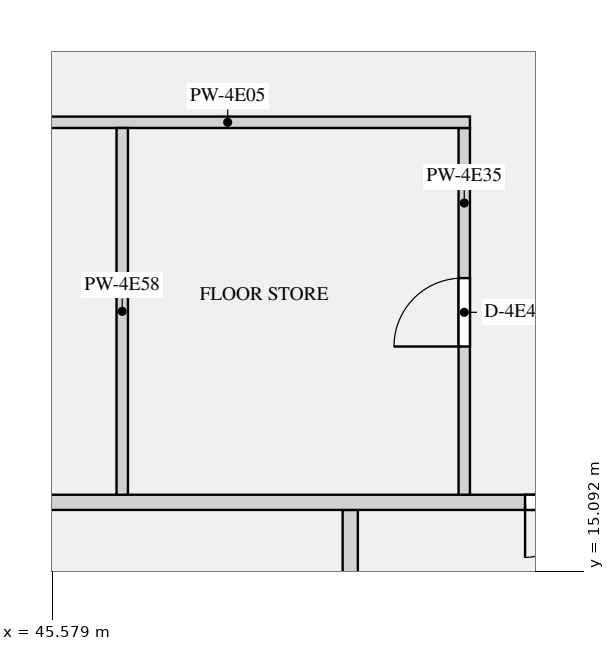
"""IFC4 building model, lengths in metres.
Left out: names, types, materials, properties, quantities, classifications, styles, units other than length and angle.
Written with IfcOpenShell. Run it as: python <this file> out.ifc"""

import sys

from ifc_helpers import new_model, si_unit, direction, frame, frame_2d, origin, place, context, subcontext, project, spatial, rectangle, extrude, element, fill, save


model = new_model("IFC4")
c1 = context("Model", 3, precision=1e-05, world=origin(), true_north=direction((0.0, 1.0)))
c2 = subcontext(c1, "Body", "Model", "MODEL_VIEW")
j1 = project(units=[si_unit("LENGTHUNIT", "METRE"), si_unit("PLANEANGLEUNIT", "RADIAN")], contexts=[c1])
p1 = place(None, origin())
s1 = spatial("IfcSite", under=j1, at=p1, CompositionType="ELEMENT")
p2 = place(p1, origin())
s2 = spatial("IfcBuilding", under=s1, at=p2, CompositionType="ELEMENT")
p3 = place(p2, frame((0.0, 0.0, 232.65)))
s3 = spatial("IfcBuildingStorey", under=s2, at=p3, CompositionType="ELEMENT", Elevation=232.65)
p4 = place(p3, frame((49.5, 12.5, 0.0), z_axis=(0.0, 0.0, 1.0), x_axis=(0.0, 1.0, 0.0)))
e1 = element("IfcWall", 1, at=p4, inside=s3, PredefinedType="PARTITIONING", context=c2, shape_type="SweptSolid", body=[
    extrude(rectangle(XDim=3.4, YDim=0.2, at=frame_2d((1.7, 0.0))), origin(), (0.0, 0.0, 1.0), 2.8),
])
p5 = place(p4, frame((1.15, 0.0, 0.0)))
e2 = element("IfcOpeningElement", 2, at=p5, cuts=e1, PredefinedType="OPENING", context=c2, shape_type="SweptSolid", body=[
    extrude(rectangle(XDim=1.1, YDim=2.1, at=frame_2d((0.55, 1.05))), frame((0.0, 0.11, 0.0), z_axis=(0.0, -1.0, 0.0), x_axis=(1.0, 0.0, 0.0)), (0.0, 0.0, 1.0), 0.22),
])
p6 = place(p3, frame((20.925, 21.0, 0.0), z_axis=(0.0, 0.0, 1.0), x_axis=(1.0, 0.0, 0.0)))
e3 = element("IfcWall", 3, at=p6, inside=s3, PredefinedType="PARTITIONING", context=c2, shape_type="SweptSolid", body=[
    extrude(rectangle(XDim=30.15, YDim=0.15, at=frame_2d((15.075, 0.0))), origin(), (0.0, 0.0, 1.0), 2.8),
])
p7 = place(p6, frame((6.375, 0.0, 0.0)))
e4 = element("IfcOpeningElement", 4, at=p7, cuts=e3, PredefinedType="OPENING", context=c2, shape_type="SweptSolid", body=[
    extrude(rectangle(XDim=0.9, YDim=2.1, at=frame_2d((0.45, 1.05))), frame((0.0, 0.085, 0.0), z_axis=(0.0, -1.0, 0.0), x_axis=(1.0, 0.0, 0.0)), (0.0, 0.0, 1.0), 0.17),
])
p8 = place(p6, frame((10.875, 0.0, 0.0)))
e5 = element("IfcOpeningElement", 5, at=p8, cuts=e3, PredefinedType="OPENING", context=c2, shape_type="SweptSolid", body=[
    extrude(rectangle(XDim=0.9, YDim=2.1, at=frame_2d((0.45, 1.05))), frame((0.0, 0.085, 0.0), z_axis=(0.0, -1.0, 0.0), x_axis=(1.0, 0.0, 0.0)), (0.0, 0.0, 1.0), 0.17),
])
p9 = place(p6, frame((16.875, 0.0, 0.0)))
e6 = element("IfcOpeningElement", 6, at=p9, cuts=e3, PredefinedType="OPENING", context=c2, shape_type="SweptSolid", body=[
    extrude(rectangle(XDim=0.9, YDim=2.1, at=frame_2d((0.45, 1.05))), frame((0.0, 0.085, 0.0), z_axis=(0.0, -1.0, 0.0), x_axis=(1.0, 0.0, 0.0)), (0.0, 0.0, 1.0), 0.17),
])
p10 = place(p6, frame((22.875, 0.0, 0.0)))
e7 = element("IfcOpeningElement", 7, at=p10, cuts=e3, PredefinedType="OPENING", context=c2, shape_type="SweptSolid", body=[
    extrude(rectangle(XDim=0.9, YDim=2.1, at=frame_2d((0.45, 1.05))), frame((0.0, 0.085, 0.0), z_axis=(0.0, -1.0, 0.0), x_axis=(1.0, 0.0, 0.0)), (0.0, 0.0, 1.0), 0.17),
])
p11 = place(p3, frame((17.9, 16.0, 0.0), z_axis=(0.0, 0.0, 1.0), x_axis=(1.0, 0.0, 0.0)))
e8 = element("IfcWall", 8, at=p11, inside=s3, PredefinedType="PARTITIONING", context=c2, shape_type="SweptSolid", body=[
    extrude(rectangle(XDim=36.2, YDim=0.2, at=frame_2d((18.1, 0.0))), origin(), (0.0, 0.0, 1.0), 2.8),
])
p12 = place(p11, frame((0.9, 0.0, 0.0)))
e9 = element("IfcOpeningElement", 9, at=p12, cuts=e8, PredefinedType="OPENING", context=c2, shape_type="SweptSolid", body=[
    extrude(rectangle(XDim=1.4, YDim=2.1, at=frame_2d((0.7, 1.05))), frame((0.0, 0.11, 0.0), z_axis=(0.0, -1.0, 0.0), x_axis=(1.0, 0.0, 0.0)), (0.0, 0.0, 1.0), 0.22),
])
p13 = place(p11, frame((33.9, 0.0, 0.0)))
e10 = element("IfcOpeningElement", 10, at=p13, cuts=e8, PredefinedType="OPENING", context=c2, shape_type="SweptSolid", body=[
    extrude(rectangle(XDim=1.4, YDim=2.1, at=frame_2d((0.7, 1.05))), frame((0.0, 0.11, 0.0), z_axis=(0.0, -1.0, 0.0), x_axis=(1.0, 0.0, 0.0)), (0.0, 0.0, 1.0), 0.22),
])
p14 = place(p3, frame((51.0, 16.1, 0.0), z_axis=(0.0, 0.0, 1.0), x_axis=(0.0, 1.0, 0.0)))
e11 = element("IfcWall", 11, at=p14, inside=s3, PredefinedType="PARTITIONING", context=c2, shape_type="SweptSolid", body=[
    extrude(rectangle(XDim=4.825, YDim=0.15, at=frame_2d((2.413, 0.0))), origin(), (0.0, 0.0, 1.0), 2.8),
])
p15 = place(p14, frame((1.95, 0.0, 0.0)))
e12 = element("IfcOpeningElement", 12, at=p15, cuts=e11, PredefinedType="OPENING", context=c2, shape_type="SweptSolid", body=[
    extrude(rectangle(XDim=0.9, YDim=2.1, at=frame_2d((0.45, 1.05))), frame((0.0, 0.085, 0.0), z_axis=(0.0, -1.0, 0.0), x_axis=(1.0, 0.0, 0.0)), (0.0, 0.0, 1.0), 0.17),
])
p16 = place(p3, frame((46.5, 16.1, 0.0), z_axis=(0.0, 0.0, 1.0), x_axis=(0.0, 1.0, 0.0)))
e13 = element("IfcWall", 13, at=p16, inside=s3, PredefinedType="PARTITIONING", context=c2, shape_type="SweptSolid", body=[
    extrude(rectangle(XDim=4.825, YDim=0.15, at=frame_2d((2.413, 0.0))), origin(), (0.0, 0.0, 1.0), 2.8),
])
p17 = place(p13, frame((1.4, 0.0, 0.0), z_axis=(0.0, 0.0, 1.0), x_axis=(-1.0, 0.0, 0.0)))
e14 = element("IfcDoor", 14, at=p17, inside=s3, OperationType="DOUBLE_DOOR_SINGLE_SWING", PredefinedType="DOOR", context=c2, shape_type="SweptSolid", body=[
    extrude(rectangle(XDim=1.4, YDim=2.1, at=frame_2d((0.7, 1.05))), frame((0.0, 0.025, 0.0), z_axis=(0.0, -1.0, 0.0), x_axis=(1.0, 0.0, 0.0)), (0.0, 0.0, 1.0), 0.05),
])
fill(e10, e14)
p18 = place(p15, origin())
e15 = element("IfcDoor", 15, at=p18, inside=s3, OperationType="SINGLE_SWING_LEFT", PredefinedType="DOOR", context=c2, shape_type="SweptSolid", body=[
    extrude(rectangle(XDim=0.9, YDim=2.1, at=frame_2d((0.45, 1.05))), frame((0.0, 0.025, 0.0), z_axis=(0.0, -1.0, 0.0), x_axis=(1.0, 0.0, 0.0)), (0.0, 0.0, 1.0), 0.05),
])
fill(e12, e15)
save(model, sys.argv[1])
